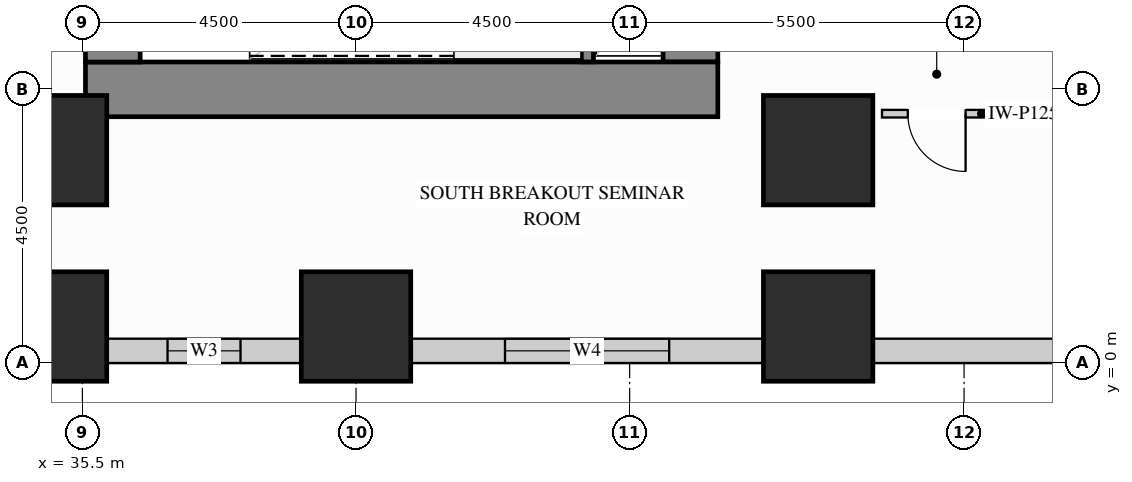
"""IFC4 building model, lengths in metres.
Left out: names, types, materials, properties, quantities, classifications, styles, units other than length and angle.
Written with IfcOpenShell. Run it as: python <this file> out.ifc"""

import sys

from ifc_helpers import new_model, si_unit, direction, frame, frame_2d, origin, origin_2d, place, context, subcontext, project, spatial, rectangle, extrude, source, transform, mapped, element, fill, save


model = new_model("IFC4")
c1 = context("Model", 3, precision=1e-05, world=origin(), true_north=direction((0.0, 1.0)))
c2 = subcontext(c1, "Body", "Model", "MODEL_VIEW")
j1 = project(units=[si_unit("LENGTHUNIT", "METRE"), si_unit("PLANEANGLEUNIT", "RADIAN")], contexts=[c1])
p1 = place(None, origin())
s1 = spatial("IfcSite", under=j1, at=p1, CompositionType="ELEMENT")
p2 = place(p1, origin())
s2 = spatial("IfcBuilding", under=s1, at=p2, CompositionType="ELEMENT")
p3 = place(p2, frame((0.0, 0.0, 13.5)))
s3 = spatial("IfcBuildingStorey", under=s2, at=p3, CompositionType="ELEMENT", Elevation=13.5)
m1 = source(origin(), c2, "Body", "SweptSolid", [
    extrude(rectangle(XDim=1.8, YDim=1.8, at=origin_2d()), origin(), (0.0, 0.0, 1.0), 4.15),
])
for number, where, z_axis, x_axis in (
    (1, (35.0, 0.6, 0.0), (0.0, 0.0, 1.0), (1.0, 0.0, 0.0)),
    (2, (40.0, 0.6, 0.0), (0.0, 0.0, 1.0), (1.0, 0.0, 0.0)),
    (3, (47.6, 0.6, 0.0), (0.0, 0.0, 1.0), (1.0, 0.0, 0.0)),
    (4, (47.6, 3.5, 0.0), (0.0, 0.0, 1.0), (1.0, 0.0, 0.0)),
    (5, (35.0, 3.5, 0.0), (0.0, 0.0, 1.0), (1.0, 0.0, 0.0)),
):
    element("IfcColumn", number, at=place(p3, frame(where, z_axis=z_axis, x_axis=x_axis)), inside=s3, PredefinedType="COLUMN", context=c2, shape_type="MappedRepresentation", body=[
        mapped(m1, transform((0.0, 0.0, 0.0), x_axis=(1.0, 0.0, 0.0), y_axis=(0.0, 1.0, 0.0), z_axis=(0.0, 0.0, 1.0))),
    ])
m2 = source(origin(), c2, "Body", "SweptSolid", [
    extrude(rectangle(XDim=5.6, YDim=0.9, at=frame_2d((2.8, 0.0))), origin(), (0.0, 0.0, 1.0), 4.15),
])
p4 = place(p3, frame((45.5, 4.95, 0.0), z_axis=(0.0, 0.0, 1.0), x_axis=(0.0, 1.0, 0.0)))
e6 = element("IfcWall", 6, at=p4, inside=s3, PredefinedType="SHEAR", context=c2, shape_type="MappedRepresentation", body=[
    mapped(m2, transform((0.0, 0.0, 0.0), x_axis=(1.0, 0.0, 0.0), y_axis=(0.0, 1.0, 0.0), z_axis=(0.0, 0.0, 1.0))),
])
m3 = source(origin(), c2, "Body", "SweptSolid", [
    extrude(rectangle(XDim=10.4, YDim=0.9, at=frame_2d((5.2, 0.0))), origin(), (0.0, 0.0, 1.0), 4.15),
])
p5 = place(p3, frame((35.55, 4.5, 0.0), z_axis=(0.0, 0.0, 1.0), x_axis=(1.0, 0.0, 0.0)))
e7 = element("IfcWall", 7, at=p5, inside=s3, PredefinedType="SHEAR", context=c2, shape_type="MappedRepresentation", body=[
    mapped(m3, transform((0.0, 0.0, 0.0), x_axis=(1.0, 0.0, 0.0), y_axis=(0.0, 1.0, 0.0), z_axis=(0.0, 0.0, 1.0))),
])
p6 = place(p3, frame((36.0, 4.95, 0.0), z_axis=(0.0, 0.0, 1.0), x_axis=(0.0, 1.0, 0.0)))
e8 = element("IfcWall", 8, at=p6, inside=s3, PredefinedType="SHEAR", context=c2, shape_type="MappedRepresentation", body=[
    mapped(m2, transform((0.0, 0.0, 0.0), x_axis=(1.0, 0.0, 0.0), y_axis=(0.0, 1.0, 0.0), z_axis=(0.0, 0.0, 1.0))),
])
p7 = place(p3, frame((35.898, 0.2, 0.0), z_axis=(0.0, 0.0, 1.0), x_axis=(1.0, 0.0, 0.0)))
e9 = element("IfcWall", 9, at=p7, inside=s3, PredefinedType="SOLIDWALL", context=c2, shape_type="SweptSolid", body=[
    extrude(rectangle(XDim=3.204, YDim=0.4, at=frame_2d((1.602, 0.0))), origin(), (0.0, 0.0, 1.0), 3.035),
])
p8 = place(p7, frame((1.002, 0.0, 0.65)))
e10 = element("IfcOpeningElement", 10, at=p8, cuts=e9, PredefinedType="OPENING", context=c2, shape_type="SweptSolid", body=[
    extrude(rectangle(XDim=1.2, YDim=2.205, at=frame_2d((0.6, 1.103))), frame((0.0, 0.21, 0.0), z_axis=(0.0, -1.0, 0.0), x_axis=(1.0, 0.0, 0.0)), (0.0, 0.0, 1.0), 0.42),
])
p9 = place(p3, frame((40.898, 0.2, 0.0), z_axis=(0.0, 0.0, 1.0), x_axis=(1.0, 0.0, 0.0)))
e11 = element("IfcWall", 11, at=p9, inside=s3, PredefinedType="SOLIDWALL", context=c2, shape_type="SweptSolid", body=[
    extrude(rectangle(XDim=5.804, YDim=0.4, at=frame_2d((2.902, 0.0))), origin(), (0.0, 0.0, 1.0), 3.035),
])
p10 = place(p9, frame((1.552, 0.0, 0.65)))
e12 = element("IfcOpeningElement", 12, at=p10, cuts=e11, PredefinedType="OPENING", context=c2, shape_type="SweptSolid", body=[
    extrude(rectangle(XDim=2.7, YDim=2.205, at=frame_2d((1.35, 1.103))), frame((0.0, 0.21, 0.0), z_axis=(0.0, -1.0, 0.0), x_axis=(1.0, 0.0, 0.0)), (0.0, 0.0, 1.0), 0.42),
])
p11 = place(p3, frame((48.498, 0.2, 0.0), z_axis=(0.0, 0.0, 1.0), x_axis=(1.0, 0.0, 0.0)))
e13 = element("IfcWall", 13, at=p11, inside=s3, PredefinedType="SOLIDWALL", context=c2, shape_type="SweptSolid", body=[
    extrude(rectangle(XDim=9.004, YDim=0.4, at=frame_2d((4.502, 0.0))), origin(), (0.0, 0.0, 1.0), 3.035),
])
p12 = place(p11, frame((3.152, 0.0, 0.65)))
e14 = element("IfcOpeningElement", 14, at=p12, cuts=e13, PredefinedType="OPENING", context=c2, shape_type="SweptSolid", body=[
    extrude(rectangle(XDim=2.7, YDim=2.205, at=frame_2d((1.35, 1.103))), frame((0.0, 0.21, 0.0), z_axis=(0.0, -1.0, 0.0), x_axis=(1.0, 0.0, 0.0)), (0.0, 0.0, 1.0), 0.42),
])
p13 = place(p3, frame((48.65, 4.1, 0.0), z_axis=(0.0, 0.0, 1.0), x_axis=(1.0, 0.0, 0.0)))
e15 = element("IfcWall", 15, at=p13, inside=s3, PredefinedType="PARTITIONING", context=c2, shape_type="SweptSolid", body=[
    extrude(rectangle(XDim=1.8, YDim=0.125, at=frame_2d((0.9, 0.0))), origin(), (0.0, 0.0, 1.0), 3.586),
])
p14 = place(p13, frame((0.425, 0.0, 0.0)))
e16 = element("IfcOpeningElement", 16, at=p14, cuts=e15, PredefinedType="OPENING", context=c2, shape_type="SweptSolid", body=[
    extrude(rectangle(XDim=0.95, YDim=2.15, at=frame_2d((0.475, 1.075))), frame((0.0, 0.073, 0.0), z_axis=(0.0, -1.0, 0.0), x_axis=(1.0, 0.0, 0.0)), (0.0, 0.0, 1.0), 0.145),
])
m4 = source(origin(), c2, "Body", "SweptSolid", [
    extrude(rectangle(XDim=3.603, YDim=0.2, at=frame_2d((1.802, 0.0))), origin(), (0.0, 0.0, 1.0), 4.15),
])
p15 = place(p3, frame((43.805, 4.952, 0.0), z_axis=(0.0, 0.0, 1.0), x_axis=(0.0, 1.0, 0.0)))
e17 = element("IfcWall", 17, at=p15, inside=s3, PredefinedType="SHEAR", context=c2, shape_type="MappedRepresentation", body=[
    mapped(m4, transform((0.0, 0.0, 0.0), x_axis=(1.0, 0.0, 0.0), y_axis=(0.0, 1.0, 0.0), z_axis=(0.0, 0.0, 1.0))),
])
m5 = source(origin(), c2, "Body", "SweptSolid", [
    extrude(rectangle(XDim=0.95, YDim=2.15, at=frame_2d((0.475, 1.075))), frame((0.0, 0.025, 0.0), z_axis=(0.0, -1.0, 0.0), x_axis=(1.0, 0.0, 0.0)), (0.0, 0.0, 1.0), 0.05),
])
p16 = place(p14, origin())
e18 = element("IfcDoor", 18, at=p16, inside=s3, OperationType="SINGLE_SWING_RIGHT", PredefinedType="DOOR", context=c2, shape_type="MappedRepresentation", body=[
    mapped(m5, transform((0.0, 0.0, 0.0), x_axis=(1.0, 0.0, 0.0), y_axis=(0.0, 1.0, 0.0), z_axis=(0.0, 0.0, 1.0))),
])
fill(e16, e18)
m6 = source(origin(), c2, "Body", "SweptSolid", [
    extrude(rectangle(XDim=1.2, YDim=2.205, at=frame_2d((0.6, 1.103))), frame((0.0, 0.03, 0.0), z_axis=(0.0, -1.0, 0.0), x_axis=(1.0, 0.0, 0.0)), (0.0, 0.0, 1.0), 0.06),
])
p17 = place(p8, origin())
e19 = element("IfcWindow", 19, at=p17, inside=s3, PartitioningType="SINGLE_PANEL", PredefinedType="WINDOW", context=c2, shape_type="MappedRepresentation", body=[
    mapped(m6, transform((0.0, 0.0, 0.0), x_axis=(1.0, 0.0, 0.0), y_axis=(0.0, 1.0, 0.0), z_axis=(0.0, 0.0, 1.0))),
])
fill(e10, e19)
m7 = source(origin(), c2, "Body", "SweptSolid", [
    extrude(rectangle(XDim=2.7, YDim=2.205, at=frame_2d((1.35, 1.103))), frame((0.0, 0.03, 0.0), z_axis=(0.0, -1.0, 0.0), x_axis=(1.0, 0.0, 0.0)), (0.0, 0.0, 1.0), 0.06),
])
p18 = place(p10, origin())
e20 = element("IfcWindow", 20, at=p18, inside=s3, PartitioningType="SINGLE_PANEL", PredefinedType="WINDOW", context=c2, shape_type="MappedRepresentation", body=[
    mapped(m7, transform((0.0, 0.0, 0.0), x_axis=(1.0, 0.0, 0.0), y_axis=(0.0, 1.0, 0.0), z_axis=(0.0, 0.0, 1.0))),
])
fill(e12, e20)
save(model, sys.argv[1])
